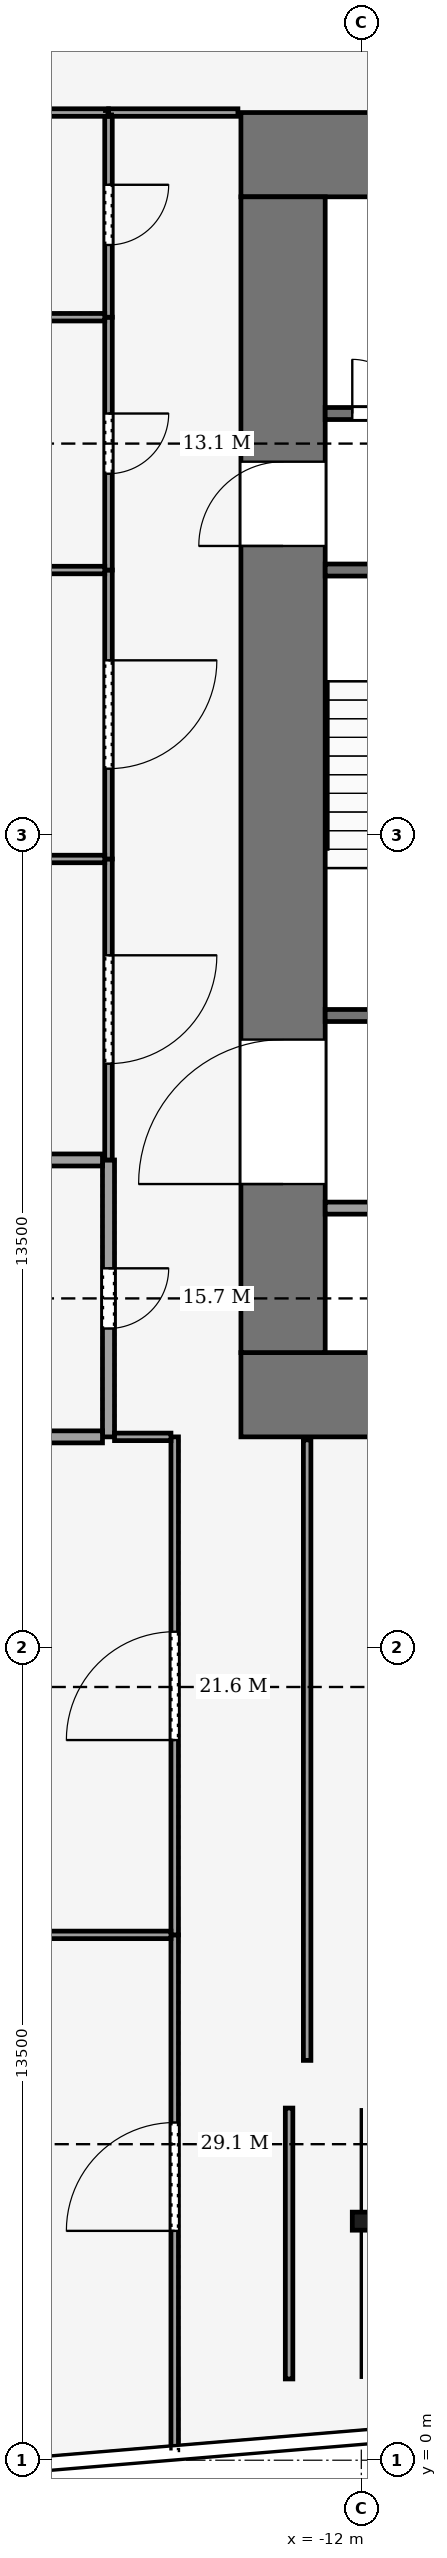
"""IFC4 building model, lengths in metres.
Left out: names, types, materials, properties, quantities, classifications, styles, units other than length and angle.
Written with IfcOpenShell. Run it as: python <this file> out.ifc"""

import sys

from ifc_helpers import new_model, si_unit, direction, frame, frame_2d, origin, origin_2d, place, context, subcontext, project, spatial, rectangle, hollow_rectangle, i_section, extrude, element, fill, save


model = new_model("IFC4")
c1 = context("Model", 3, precision=1e-05, world=origin(), true_north=direction((0.0, 1.0)))
c2 = subcontext(c1, "Body", "Model", "MODEL_VIEW")
j1 = project(units=[si_unit("LENGTHUNIT", "METRE"), si_unit("PLANEANGLEUNIT", "RADIAN")], contexts=[c1])
p1 = place(None, origin())
s1 = spatial("IfcSite", under=j1, at=p1, CompositionType="ELEMENT")
p2 = place(p1, origin())
s2 = spatial("IfcBuilding", under=s1, at=p2, CompositionType="ELEMENT")
p3 = place(p2, frame((0.0, 0.0, 58.0)))
s3 = spatial("IfcBuildingStorey", under=s2, at=p3, CompositionType="ELEMENT", Elevation=58.0)
for number, where, z_axis, x_axis in (
    (1, (-14.0, 17.7, -0.25), (0.0, 0.0, 1.0), (1.0, 0.0, 0.0)),
    (2, (-14.0, 38.3, -0.25), (0.0, 0.0, 1.0), (1.0, 0.0, 0.0)),
):
    element("IfcWall", number, at=place(p3, frame(where, z_axis=z_axis, x_axis=x_axis)), inside=s3, PredefinedType="SHEAR", context=c2, shape_type="SweptSolid", body=[
        extrude(rectangle(XDim=28.0, YDim=1.4, at=frame_2d((14.0, 0.0))), origin(), (0.0, 0.0, 1.0), 7.12),
    ])
p4 = place(p3, frame((-13.3, 18.4, -0.25), z_axis=(0.0, 0.0, 1.0), x_axis=(0.0, 1.0, 0.0)))
e3 = element("IfcWall", 3, at=p4, inside=s3, PredefinedType="SHEAR", context=c2, shape_type="SweptSolid", body=[
    extrude(rectangle(XDim=19.2, YDim=1.4, at=frame_2d((9.6, 0.0))), origin(), (0.0, 0.0, 1.0), 7.12),
])
p5 = place(p4, frame((2.8, 0.0, 0.25)))
e4 = element("IfcOpeningElement", 4, at=p5, cuts=e3, PredefinedType="OPENING", context=c2, shape_type="SweptSolid", body=[
    extrude(rectangle(XDim=2.4, YDim=2.4, at=frame_2d((1.2, 1.2))), frame((0.0, 0.71, 0.0), z_axis=(0.0, -1.0, 0.0), x_axis=(1.0, 0.0, 0.0)), (0.0, 0.0, 1.0), 1.42),
])
p6 = place(p4, frame((13.4, 0.0, 0.25)))
e5 = element("IfcOpeningElement", 5, at=p6, cuts=e3, PredefinedType="OPENING", context=c2, shape_type="SweptSolid", body=[
    extrude(rectangle(XDim=1.4, YDim=2.2, at=frame_2d((0.7, 1.1))), frame((0.0, 0.71, 0.0), z_axis=(0.0, -1.0, 0.0), x_axis=(1.0, 0.0, 0.0)), (0.0, 0.0, 1.0), 1.42),
])
p7 = place(p3, frame((-12.0, 1.35, 0.255), z_axis=(0.0, 0.569788529315, 0.821791355431), x_axis=(-1.0, 0.0, 0.0)))
e6 = element("IfcColumn", 6, at=p7, inside=s3, PredefinedType="COLUMN", context=c2, shape_type="SweptSolid", body=[
    extrude(hollow_rectangle(XDim=0.8, YDim=0.8, WallThickness=0.04, at=origin_2d()), origin(), (0.0, 0.0, 1.0), 7.898),
])
p8 = place(p3, frame((-12.0, 3.971, 4.954), z_axis=(0.0, 0.0, 1.0), x_axis=(1.0, 0.0, 0.0)))
e7 = element("IfcColumn", 7, at=p8, inside=s3, PredefinedType="COLUMN", context=c2, shape_type="SweptSolid", body=[
    extrude(i_section(OverallWidth=0.3, OverallDepth=0.3, WebThickness=0.011, FlangeThickness=0.019, FilletRadius=0.027, at=origin_2d()), origin(), (0.0, 0.0, 1.0), 1.746),
])
p9 = place(p3, frame((-12.6, 20.8, 0.0), z_axis=(0.0, 0.0, 1.0), x_axis=(1.0, 0.0, 0.0)))
e8 = element("IfcWall", 8, at=p9, inside=s3, PredefinedType="PARTITIONING", context=c2, shape_type="SweptSolid", body=[
    extrude(rectangle(XDim=6.6, YDim=0.2, at=frame_2d((3.3, 0.0))), origin(), (0.0, 0.0, 1.0), 6.87),
])
p10 = place(p9, frame((2.8, 0.0, 0.0)))
e9 = element("IfcOpeningElement", 9, at=p10, cuts=e8, PredefinedType="OPENING", context=c2, shape_type="SweptSolid", body=[
    extrude(rectangle(XDim=1.0, YDim=2.1, at=frame_2d((0.5, 1.05))), frame((0.0, 0.11, 0.0), z_axis=(0.0, -1.0, 0.0), x_axis=(1.0, 0.0, 0.0)), (0.0, 0.0, 1.0), 0.22),
])
p11 = place(p3, frame((-12.6, 24.0, 0.0), z_axis=(0.0, 0.0, 1.0), x_axis=(1.0, 0.0, 0.0)))
e10 = element("IfcWall", 10, at=p11, inside=s3, PredefinedType="PARTITIONING", context=c2, shape_type="SweptSolid", body=[
    extrude(rectangle(XDim=6.6, YDim=0.2, at=frame_2d((3.3, 0.0))), origin(), (0.0, 0.0, 1.0), 6.87),
])
p12 = place(p11, frame((4.7, 0.0, 0.0)))
e11 = element("IfcOpeningElement", 11, at=p12, cuts=e10, PredefinedType="OPENING", context=c2, shape_type="SweptSolid", body=[
    extrude(rectangle(XDim=1.0, YDim=2.1, at=frame_2d((0.5, 1.05))), frame((0.0, 0.11, 0.0), z_axis=(0.0, -1.0, 0.0), x_axis=(1.0, 0.0, 0.0)), (0.0, 0.0, 1.0), 0.22),
])
p13 = place(p3, frame((-12.6, 31.4, 0.0), z_axis=(0.0, 0.0, 1.0), x_axis=(1.0, 0.0, 0.0)))
e12 = element("IfcWall", 12, at=p13, inside=s3, PredefinedType="PARTITIONING", context=c2, shape_type="SweptSolid", body=[
    extrude(rectangle(XDim=6.6, YDim=0.2, at=frame_2d((3.3, 0.0))), origin(), (0.0, 0.0, 1.0), 6.87),
])
p14 = place(p13, frame((1.0, 0.0, 0.0)))
e13 = element("IfcOpeningElement", 13, at=p14, cuts=e12, PredefinedType="OPENING", context=c2, shape_type="SweptSolid", body=[
    extrude(rectangle(XDim=1.2, YDim=2.2, at=frame_2d((0.6, 1.1))), frame((0.0, 0.11, 0.0), z_axis=(0.0, -1.0, 0.0), x_axis=(1.0, 0.0, 0.0)), (0.0, 0.0, 1.0), 0.22),
])
p15 = place(p3, frame((-12.6, 34.0, 0.0), z_axis=(0.0, 0.0, 1.0), x_axis=(1.0, 0.0, 0.0)))
e14 = element("IfcWall", 14, at=p15, inside=s3, PredefinedType="PARTITIONING", context=c2, shape_type="SweptSolid", body=[
    extrude(rectangle(XDim=6.6, YDim=0.2, at=frame_2d((3.3, 0.0))), origin(), (0.0, 0.0, 1.0), 6.87),
])
p16 = place(p15, frame((4.7, 0.0, 0.0)))
e15 = element("IfcOpeningElement", 15, at=p16, cuts=e14, PredefinedType="OPENING", context=c2, shape_type="SweptSolid", body=[
    extrude(rectangle(XDim=1.4, YDim=2.2, at=frame_2d((0.7, 1.1))), frame((0.0, 0.11, 0.0), z_axis=(0.0, -1.0, 0.0), x_axis=(1.0, 0.0, 0.0)), (0.0, 0.0, 1.0), 0.22),
])
p17 = place(p15, frame((2.3, 0.0, 0.0)))
e16 = element("IfcOpeningElement", 16, at=p17, cuts=e14, PredefinedType="OPENING", context=c2, shape_type="SweptSolid", body=[
    extrude(rectangle(XDim=1.4, YDim=2.2, at=frame_2d((0.7, 1.1))), frame((0.0, 0.11, 0.0), z_axis=(0.0, -1.0, 0.0), x_axis=(1.0, 0.0, 0.0)), (0.0, 0.0, 1.0), 0.22),
])
p18 = place(p15, frame((0.45, 0.0, 0.0)))
e17 = element("IfcOpeningElement", 17, at=p18, cuts=e14, PredefinedType="OPENING", context=c2, shape_type="SweptSolid", body=[
    extrude(rectangle(XDim=0.9, YDim=2.1, at=frame_2d((0.45, 1.05))), frame((0.0, 0.11, 0.0), z_axis=(0.0, -1.0, 0.0), x_axis=(1.0, 0.0, 0.0)), (0.0, 0.0, 1.0), 0.22),
])
p19 = place(p3, frame((-16.2, 21.6, 0.0), z_axis=(0.0, 0.0, 1.0), x_axis=(0.0, -1.0, 0.0)))
e18 = element("IfcWall", 18, at=p19, inside=s3, PredefinedType="PARTITIONING", context=c2, shape_type="SweptSolid", body=[
    extrude(rectangle(XDim=4.6, YDim=0.2, at=frame_2d((2.3, 0.0))), origin(), (0.0, 0.0, 1.0), 6.14),
])
p20 = place(p19, frame((1.8, 0.0, 0.0)))
e19 = element("IfcOpeningElement", 19, at=p20, cuts=e18, PredefinedType="OPENING", context=c2, shape_type="SweptSolid", body=[
    extrude(rectangle(XDim=1.0, YDim=2.1, at=frame_2d((0.5, 1.05))), frame((0.0, 0.11, 0.0), z_axis=(0.0, -1.0, 0.0), x_axis=(1.0, 0.0, 0.0)), (0.0, 0.0, 1.0), 0.22),
])
p21 = place(p3, frame((-16.2, 26.6, 0.0), z_axis=(0.0, 0.0, 1.0), x_axis=(0.0, -1.0, 0.0)))
e20 = element("IfcWall", 20, at=p21, inside=s3, PredefinedType="PARTITIONING", context=c2, shape_type="SweptSolid", body=[
    extrude(rectangle(XDim=5.0, YDim=0.125, at=frame_2d((2.5, 0.0))), origin(), (0.0, 0.0, 1.0), 6.44),
])
p22 = place(p21, frame((1.6, 0.0, 0.0)))
e21 = element("IfcOpeningElement", 21, at=p22, cuts=e20, PredefinedType="OPENING", context=c2, shape_type="SweptSolid", body=[
    extrude(rectangle(XDim=1.8, YDim=2.4, at=frame_2d((0.9, 1.2))), frame((0.0, 0.073, 0.0), z_axis=(0.0, -1.0, 0.0), x_axis=(1.0, 0.0, 0.0)), (0.0, 0.0, 1.0), 0.145),
])
p23 = place(p3, frame((-16.2, 31.4, 0.0), z_axis=(0.0, 0.0, 1.0), x_axis=(0.0, -1.0, 0.0)))
e22 = element("IfcWall", 22, at=p23, inside=s3, PredefinedType="PARTITIONING", context=c2, shape_type="SweptSolid", body=[
    extrude(rectangle(XDim=4.8, YDim=0.125, at=frame_2d((2.4, 0.0))), origin(), (0.0, 0.0, 1.0), 6.44),
])
p24 = place(p23, frame((1.5, 0.0, 0.0)))
e23 = element("IfcOpeningElement", 23, at=p24, cuts=e22, PredefinedType="OPENING", context=c2, shape_type="SweptSolid", body=[
    extrude(rectangle(XDim=1.8, YDim=2.4, at=frame_2d((0.9, 1.2))), frame((0.0, 0.073, 0.0), z_axis=(0.0, -1.0, 0.0), x_axis=(1.0, 0.0, 0.0)), (0.0, 0.0, 1.0), 0.145),
])
p25 = place(p3, frame((-16.2, 35.6, 0.0), z_axis=(0.0, 0.0, 1.0), x_axis=(0.0, -1.0, 0.0)))
e24 = element("IfcWall", 24, at=p25, inside=s3, PredefinedType="PARTITIONING", context=c2, shape_type="SweptSolid", body=[
    extrude(rectangle(XDim=4.2, YDim=0.125, at=frame_2d((2.1, 0.0))), origin(), (0.0, 0.0, 1.0), 6.44),
])
p26 = place(p25, frame((1.6, 0.0, 0.0)))
e25 = element("IfcOpeningElement", 25, at=p26, cuts=e24, PredefinedType="OPENING", context=c2, shape_type="SweptSolid", body=[
    extrude(rectangle(XDim=1.0, YDim=2.1, at=frame_2d((0.5, 1.05))), frame((0.0, 0.073, 0.0), z_axis=(0.0, -1.0, 0.0), x_axis=(1.0, 0.0, 0.0)), (0.0, 0.0, 1.0), 0.145),
])
p27 = place(p3, frame((-16.2, 39.0, 0.0), z_axis=(0.0, 0.0, 1.0), x_axis=(0.0, -1.0, 0.0)))
e26 = element("IfcWall", 26, at=p27, inside=s3, PredefinedType="PARTITIONING", context=c2, shape_type="SweptSolid", body=[
    extrude(rectangle(XDim=3.4, YDim=0.125, at=frame_2d((1.7, 0.0))), origin(), (0.0, 0.0, 1.0), 6.14),
])
p28 = place(p27, frame((1.2, 0.0, 0.0)))
e27 = element("IfcOpeningElement", 27, at=p28, cuts=e26, PredefinedType="OPENING", context=c2, shape_type="SweptSolid", body=[
    extrude(rectangle(XDim=1.0, YDim=2.1, at=frame_2d((0.5, 1.05))), frame((0.0, 0.073, 0.0), z_axis=(0.0, -1.0, 0.0), x_axis=(1.0, 0.0, 0.0)), (0.0, 0.0, 1.0), 0.145),
])
p29 = place(p3, frame((-15.1, 0.162, 0.0), z_axis=(0.0, 0.0, 1.0), x_axis=(0.0, 1.0, 0.0)))
e28 = element("IfcWall", 28, at=p29, inside=s3, PredefinedType="PARTITIONING", context=c2, shape_type="SweptSolid", body=[
    extrude(rectangle(XDim=8.565, YDim=0.125, at=frame_2d((4.283, 0.0))), origin(), (0.0, 0.0, 1.0), 6.04),
])
p30 = place(p29, frame((3.648, 0.0, 0.0)))
e29 = element("IfcOpeningElement", 29, at=p30, cuts=e28, PredefinedType="OPENING", context=c2, shape_type="SweptSolid", body=[
    extrude(rectangle(XDim=1.8, YDim=2.4, at=frame_2d((0.9, 1.2))), frame((0.0, 0.073, 0.0), z_axis=(0.0, -1.0, 0.0), x_axis=(1.0, 0.0, 0.0)), (0.0, 0.0, 1.0), 0.145),
])
p31 = place(p3, frame((-15.1, 8.727, 0.0), z_axis=(0.0, 0.0, 1.0), x_axis=(0.0, 1.0, 0.0)))
e30 = element("IfcWall", 30, at=p31, inside=s3, PredefinedType="PARTITIONING", context=c2, shape_type="SweptSolid", body=[
    extrude(rectangle(XDim=8.273, YDim=0.125, at=frame_2d((4.136, 0.0))), origin(), (0.0, 0.0, 1.0), 6.14),
])
p32 = place(p31, frame((3.237, 0.0, 0.0)))
e31 = element("IfcOpeningElement", 31, at=p32, cuts=e30, PredefinedType="OPENING", context=c2, shape_type="SweptSolid", body=[
    extrude(rectangle(XDim=1.8, YDim=2.4, at=frame_2d((0.9, 1.2))), frame((0.0, 0.073, 0.0), z_axis=(0.0, -1.0, 0.0), x_axis=(1.0, 0.0, 0.0)), (0.0, 0.0, 1.0), 0.145),
])
p33 = place(p3, frame((-15.163, 17.0, 0.0), z_axis=(0.0, 0.0, 1.0), x_axis=(-1.0, 0.0, 0.0)))
e32 = element("IfcWall", 32, at=p33, inside=s3, PredefinedType="PARTITIONING", context=c2, shape_type="SweptSolid", body=[
    extrude(rectangle(XDim=0.938, YDim=0.125, at=frame_2d((0.469, 0.0))), origin(), (0.0, 0.0, 1.0), 6.14),
])
p34 = place(p3, frame((-19.9, 21.6, 0.0), z_axis=(0.0, 0.0, 1.0), x_axis=(1.0, 0.0, 0.0)))
e33 = element("IfcWall", 33, at=p34, inside=s3, PredefinedType="PARTITIONING", context=c2, shape_type="SweptSolid", body=[
    extrude(rectangle(XDim=3.6, YDim=0.2, at=frame_2d((1.8, 0.0))), origin(), (0.0, 0.0, 1.0), 6.87),
])
p35 = place(p3, frame((-16.3, 17.0, 0.0), z_axis=(0.0, 0.0, 1.0), x_axis=(-1.0, 0.0, 0.0)))
e34 = element("IfcWall", 34, at=p35, inside=s3, PredefinedType="PARTITIONING", context=c2, shape_type="SweptSolid", body=[
    extrude(rectangle(XDim=3.6, YDim=0.2, at=frame_2d((1.8, 0.0))), origin(), (0.0, 0.0, 1.0), 6.14),
])
p36 = place(p3, frame((-19.8, 26.6, 0.0), z_axis=(0.0, 0.0, 1.0), x_axis=(1.0, 0.0, 0.0)))
e35 = element("IfcWall", 35, at=p36, inside=s3, PredefinedType="PARTITIONING", context=c2, shape_type="SweptSolid", body=[
    extrude(rectangle(XDim=3.538, YDim=0.125, at=frame_2d((1.769, 0.0))), origin(), (0.0, 0.0, 1.0), 6.87),
])
for number, where, z_axis, x_axis in (
    (36, (-19.9, 31.4, 0.0), (0.0, 0.0, 1.0), (1.0, 0.0, 0.0)),
    (37, (-19.9, 35.6, 0.0), (0.0, 0.0, 1.0), (1.0, 0.0, 0.0)),
):
    element("IfcWall", number, at=place(p3, frame(where, z_axis=z_axis, x_axis=x_axis)), inside=s3, PredefinedType="PARTITIONING", context=c2, shape_type="SweptSolid", body=[
        extrude(rectangle(XDim=3.637, YDim=0.125, at=frame_2d((1.819, 0.0))), origin(), (0.0, 0.0, 1.0), 6.87),
    ])
p37 = place(p3, frame((-19.9, 8.727, 0.0), z_axis=(0.0, 0.0, 1.0), x_axis=(1.0, 0.0, 0.0)))
e38 = element("IfcWall", 38, at=p37, inside=s3, PredefinedType="PARTITIONING", context=c2, shape_type="SweptSolid", body=[
    extrude(rectangle(XDim=4.737, YDim=0.125, at=frame_2d((2.369, 0.0))), origin(), (0.0, 0.0, 1.0), 6.34),
])
p38 = place(p3, frame((-16.198, 39.0, 0.0), z_axis=(0.0, 0.0, 1.0), x_axis=(1.0, 0.0, 0.0)))
e39 = element("IfcWall", 39, at=p38, inside=s3, PredefinedType="PARTITIONING", context=c2, shape_type="SweptSolid", body=[
    extrude(rectangle(XDim=2.148, YDim=0.125, at=frame_2d((1.074, 0.0))), origin(), (0.0, 0.0, 1.0), 6.14),
])
p39 = place(p3, frame((-12.9, 16.95, 0.0), z_axis=(0.0, 0.0, 1.0), x_axis=(0.0, -1.0, 0.0)))
e40 = element("IfcWall", 40, at=p39, inside=s3, PredefinedType="PARTITIONING", context=c2, shape_type="SweptSolid", body=[
    extrude(rectangle(XDim=10.308, YDim=0.125, at=frame_2d((5.154, 0.0))), origin(), (0.0, 0.0, 1.0), 6.87),
])
p40 = place(p3, frame((-13.2, 5.85, 0.0), z_axis=(0.0, 0.0, 1.0), x_axis=(0.0, -1.0, 0.0)))
e41 = element("IfcWall", 41, at=p40, inside=s3, PredefinedType="PARTITIONING", context=c2, shape_type="SweptSolid", body=[
    extrude(rectangle(XDim=4.5, YDim=0.125, at=frame_2d((2.25, 0.0))), origin(), (0.0, 0.0, 1.0), 6.04),
])
p41 = place(p3, frame((-19.837, 39.0, 0.0), z_axis=(0.0, 0.0, 1.0), x_axis=(1.0, 0.0, 0.0)))
e42 = element("IfcWall", 42, at=p41, inside=s3, PredefinedType="PARTITIONING", context=c2, shape_type="SweptSolid", body=[
    extrude(rectangle(XDim=3.635, YDim=0.125, at=frame_2d((1.818, 0.0))), origin(), (0.0, 0.0, 1.0), 6.14),
])
p42 = place(p18, origin())
e43 = element("IfcDoor", 43, at=p42, inside=s3, OperationType="SINGLE_SWING_RIGHT", PredefinedType="DOOR", context=c2, shape_type="SweptSolid", body=[
    extrude(rectangle(XDim=0.9, YDim=2.1, at=frame_2d((0.45, 1.05))), frame((0.0, 0.025, 0.0), z_axis=(0.0, -1.0, 0.0), x_axis=(1.0, 0.0, 0.0)), (0.0, 0.0, 1.0), 0.05),
])
fill(e17, e43)
p43 = place(p5, origin())
e44 = element("IfcDoor", 44, at=p43, inside=s3, OperationType="DOUBLE_DOOR_SINGLE_SWING", PredefinedType="DOOR", context=c2, shape_type="SweptSolid", body=[
    extrude(rectangle(XDim=2.4, YDim=2.4, at=frame_2d((1.2, 1.2))), frame((0.0, 0.025, 0.0), z_axis=(0.0, -1.0, 0.0), x_axis=(1.0, 0.0, 0.0)), (0.0, 0.0, 1.0), 0.05),
])
fill(e4, e44)
p44 = place(p6, origin())
e45 = element("IfcDoor", 45, at=p44, inside=s3, OperationType="SINGLE_SWING_RIGHT", PredefinedType="DOOR", context=c2, shape_type="SweptSolid", body=[
    extrude(rectangle(XDim=1.4, YDim=2.2, at=frame_2d((0.7, 1.1))), frame((0.0, 0.025, 0.0), z_axis=(0.0, -1.0, 0.0), x_axis=(1.0, 0.0, 0.0)), (0.0, 0.0, 1.0), 0.05),
])
fill(e5, e45)
p45 = place(p20, origin())
e46 = element("IfcDoor", 46, at=p45, inside=s3, OperationType="SINGLE_SWING_RIGHT", PredefinedType="DOOR", context=c2, shape_type="SweptSolid", body=[
    extrude(rectangle(XDim=1.0, YDim=2.1, at=frame_2d((0.5, 1.05))), frame((0.0, 0.025, 0.0), z_axis=(0.0, -1.0, 0.0), x_axis=(1.0, 0.0, 0.0)), (0.0, 0.0, 1.0), 0.05),
])
fill(e19, e46)
p46 = place(p22, origin())
e47 = element("IfcDoor", 47, at=p46, inside=s3, OperationType="DOUBLE_DOOR_SINGLE_SWING", PredefinedType="DOOR", context=c2, shape_type="SweptSolid", body=[
    extrude(rectangle(XDim=1.8, YDim=2.4, at=frame_2d((0.9, 1.2))), frame((0.0, 0.025, 0.0), z_axis=(0.0, -1.0, 0.0), x_axis=(1.0, 0.0, 0.0)), (0.0, 0.0, 1.0), 0.05),
])
fill(e21, e47)
p47 = place(p24, origin())
e48 = element("IfcDoor", 48, at=p47, inside=s3, OperationType="DOUBLE_DOOR_SINGLE_SWING", PredefinedType="DOOR", context=c2, shape_type="SweptSolid", body=[
    extrude(rectangle(XDim=1.8, YDim=2.4, at=frame_2d((0.9, 1.2))), frame((0.0, 0.025, 0.0), z_axis=(0.0, -1.0, 0.0), x_axis=(1.0, 0.0, 0.0)), (0.0, 0.0, 1.0), 0.05),
])
fill(e23, e48)
p48 = place(p26, origin())
e49 = element("IfcDoor", 49, at=p48, inside=s3, OperationType="SINGLE_SWING_LEFT", PredefinedType="DOOR", context=c2, shape_type="SweptSolid", body=[
    extrude(rectangle(XDim=1.0, YDim=2.1, at=frame_2d((0.5, 1.05))), frame((0.0, 0.025, 0.0), z_axis=(0.0, -1.0, 0.0), x_axis=(1.0, 0.0, 0.0)), (0.0, 0.0, 1.0), 0.05),
])
fill(e25, e49)
p49 = place(p28, origin())
e50 = element("IfcDoor", 50, at=p49, inside=s3, OperationType="SINGLE_SWING_RIGHT", PredefinedType="DOOR", context=c2, shape_type="SweptSolid", body=[
    extrude(rectangle(XDim=1.0, YDim=2.1, at=frame_2d((0.5, 1.05))), frame((0.0, 0.025, 0.0), z_axis=(0.0, -1.0, 0.0), x_axis=(1.0, 0.0, 0.0)), (0.0, 0.0, 1.0), 0.05),
])
fill(e27, e50)
p50 = place(p30, origin())
e51 = element("IfcDoor", 51, at=p50, inside=s3, OperationType="DOUBLE_DOOR_SINGLE_SWING", PredefinedType="DOOR", context=c2, shape_type="SweptSolid", body=[
    extrude(rectangle(XDim=1.8, YDim=2.4, at=frame_2d((0.9, 1.2))), frame((0.0, 0.025, 0.0), z_axis=(0.0, -1.0, 0.0), x_axis=(1.0, 0.0, 0.0)), (0.0, 0.0, 1.0), 0.05),
])
fill(e29, e51)
p51 = place(p32, origin())
e52 = element("IfcDoor", 52, at=p51, inside=s3, OperationType="DOUBLE_DOOR_SINGLE_SWING", PredefinedType="DOOR", context=c2, shape_type="SweptSolid", body=[
    extrude(rectangle(XDim=1.8, YDim=2.4, at=frame_2d((0.9, 1.2))), frame((0.0, 0.025, 0.0), z_axis=(0.0, -1.0, 0.0), x_axis=(1.0, 0.0, 0.0)), (0.0, 0.0, 1.0), 0.05),
])
fill(e31, e52)
save(model, sys.argv[1])
